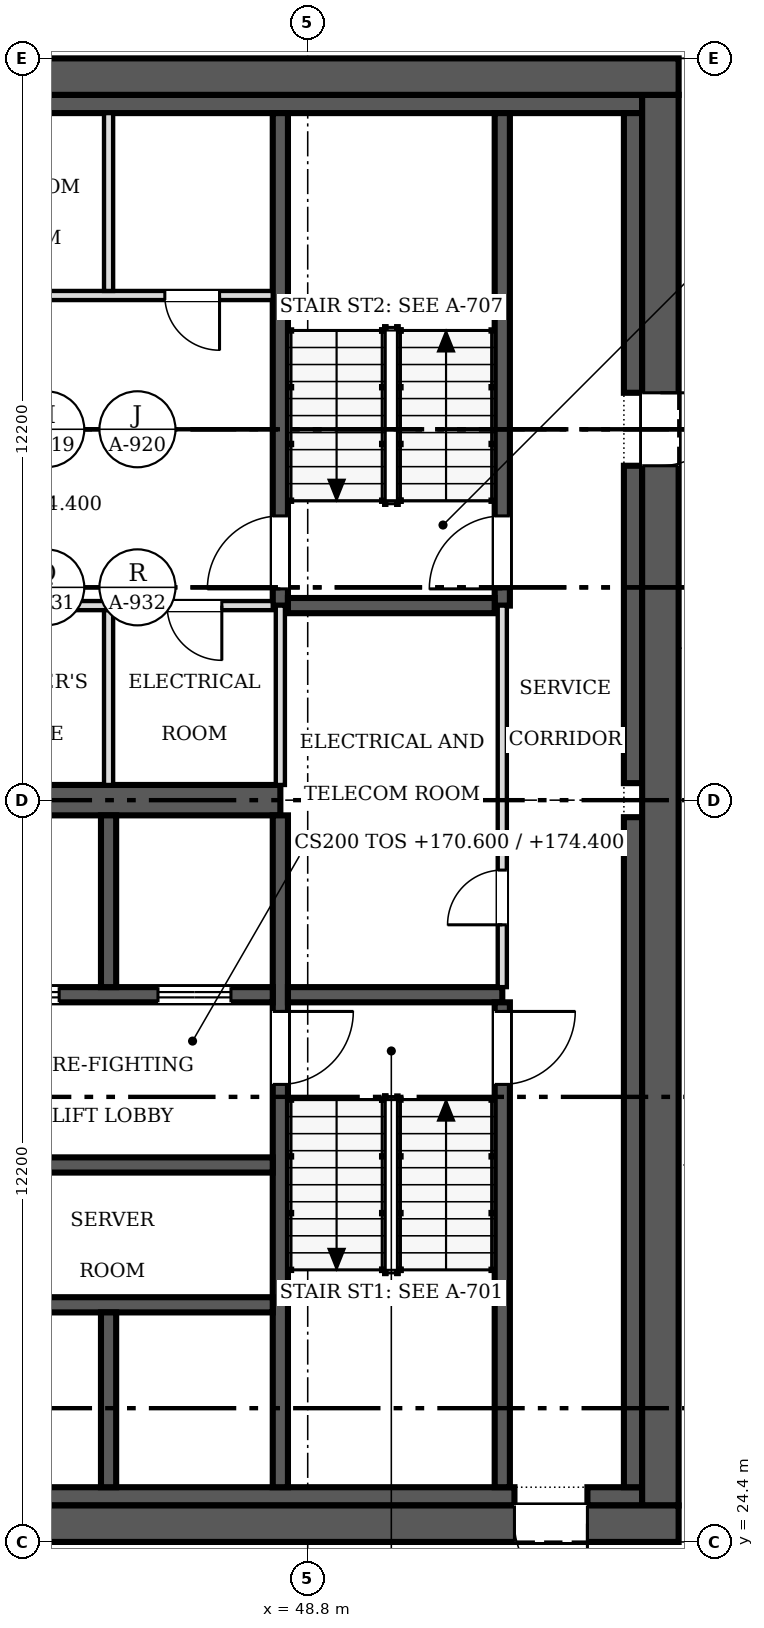
"""IFC4 building model, lengths in metres.
Left out: names, types, materials, properties, quantities, classifications, styles, units other than length and angle.
Written with IfcOpenShell. Run it as: python <this file> out.ifc"""

import sys

from ifc_helpers import new_model, si_unit, direction, frame, frame_2d, origin, place, context, subcontext, project, spatial, rectangle, extrude, source, transform, mapped, element, fill, save


model = new_model("IFC4")
c1 = context("Model", 3, precision=1e-05, world=origin(), true_north=direction((0.0, 1.0)))
c2 = subcontext(c1, "Body", "Model", "MODEL_VIEW")
j1 = project(units=[si_unit("LENGTHUNIT", "METRE"), si_unit("PLANEANGLEUNIT", "RADIAN")], contexts=[c1])
p1 = place(None, origin())
s1 = spatial("IfcSite", under=j1, at=p1, CompositionType="ELEMENT")
p2 = place(p1, origin())
s2 = spatial("IfcBuilding", under=s1, at=p2, CompositionType="ELEMENT")
p3 = place(p2, frame((0.0, 0.0, 170.6)))
s3 = spatial("IfcBuildingStorey", under=s2, at=p3, CompositionType="ELEMENT", Elevation=170.6)
p4 = place(p3, frame((54.9, 24.7, 0.0), z_axis=(0.0, 0.0, 1.0), x_axis=(-1.0, 0.0, 0.0)))
e1 = element("IfcWall", 1, at=p4, inside=s3, PredefinedType="SHEAR", context=c2, shape_type="SweptSolid", body=[
    extrude(rectangle(XDim=24.4, YDim=0.6, at=frame_2d((12.2, 0.0))), origin(), (0.0, 0.0, 1.0), 3.8),
])
m1 = source(origin(), c2, "Body", "SweptSolid", [
    extrude(rectangle(XDim=1.2, YDim=2.1, at=frame_2d((0.6, 1.05))), frame((0.0, 0.31, 0.0), z_axis=(0.0, -1.0, 0.0), x_axis=(1.0, 0.0, 0.0)), (0.0, 0.0, 1.0), 0.62),
])
p5 = place(p4, frame((1.5, 0.0, 0.0)))
e2 = element("IfcOpeningElement", 2, at=p5, cuts=e1, PredefinedType="OPENING", context=c2, shape_type="MappedRepresentation", body=[
    mapped(m1, transform((0.0, 0.0, 0.0), scale=1.0)),
])
p6 = place(p3, frame((30.5, 48.5, 0.0), z_axis=(0.0, 0.0, 1.0), x_axis=(1.0, 0.0, 0.0)))
e3 = element("IfcWall", 3, at=p6, inside=s3, PredefinedType="SHEAR", context=c2, shape_type="SweptSolid", body=[
    extrude(rectangle(XDim=24.4, YDim=0.6, at=frame_2d((12.2, 0.0))), origin(), (0.0, 0.0, 1.0), 3.8),
])
p7 = place(p3, frame((54.6, 48.2, 0.0), z_axis=(0.0, 0.0, 1.0), x_axis=(0.0, -1.0, 0.0)))
e4 = element("IfcWall", 4, at=p7, inside=s3, PredefinedType="SHEAR", context=c2, shape_type="SweptSolid", body=[
    extrude(rectangle(XDim=23.2, YDim=0.6, at=frame_2d((11.6, 0.0))), origin(), (0.0, 0.0, 1.0), 3.8),
])
p8 = place(p7, frame((4.9, 0.0, 0.0)))
e5 = element("IfcOpeningElement", 5, at=p8, cuts=e4, PredefinedType="OPENING", context=c2, shape_type="MappedRepresentation", body=[
    mapped(m1, transform((0.0, 0.0, 0.0), scale=1.0)),
])
p9 = place(p3, frame((31.1, 25.15, 0.0), z_axis=(0.0, 0.0, 1.0), x_axis=(1.0, 0.0, 0.0)))
e6 = element("IfcWall", 6, at=p9, inside=s3, PredefinedType="SOLIDWALL", context=c2, shape_type="SweptSolid", body=[
    extrude(rectangle(XDim=21.1, YDim=0.3, at=frame_2d((10.55, 0.0))), origin(), (0.0, 0.0, 1.0), 3.8),
])
p10 = place(p3, frame((53.4, 25.15, 0.0), z_axis=(0.0, 0.0, 1.0), x_axis=(1.0, 0.0, 0.0)))
e7 = element("IfcWall", 7, at=p10, inside=s3, PredefinedType="SOLIDWALL", context=c2, shape_type="SweptSolid", body=[
    extrude(rectangle(XDim=0.9, YDim=0.3, at=frame_2d((0.45, 0.0))), origin(), (0.0, 0.0, 1.0), 3.8),
])
p11 = place(p3, frame((31.1, 48.05, 0.0), z_axis=(0.0, 0.0, 1.0), x_axis=(1.0, 0.0, 0.0)))
e8 = element("IfcWall", 8, at=p11, inside=s3, PredefinedType="SOLIDWALL", context=c2, shape_type="SweptSolid", body=[
    extrude(rectangle(XDim=23.2, YDim=0.3, at=frame_2d((11.6, 0.0))), origin(), (0.0, 0.0, 1.0), 3.8),
])
p12 = place(p3, frame((54.15, 25.3, 0.0), z_axis=(0.0, 0.0, 1.0), x_axis=(0.0, 1.0, 0.0)))
e9 = element("IfcWall", 9, at=p12, inside=s3, PredefinedType="SOLIDWALL", context=c2, shape_type="SweptSolid", body=[
    extrude(rectangle(XDim=11.02, YDim=0.3, at=frame_2d((5.51, 0.0))), origin(), (0.0, 0.0, 1.0), 3.8),
])
p13 = place(p3, frame((54.15, 36.88, 0.0), z_axis=(0.0, 0.0, 1.0), x_axis=(0.0, 1.0, 0.0)))
e10 = element("IfcWall", 10, at=p13, inside=s3, PredefinedType="SOLIDWALL", context=c2, shape_type="SweptSolid", body=[
    extrude(rectangle(XDim=5.22, YDim=0.3, at=frame_2d((2.61, 0.0))), origin(), (0.0, 0.0, 1.0), 3.8),
])
p14 = place(p3, frame((54.15, 43.3, 0.0), z_axis=(0.0, 0.0, 1.0), x_axis=(0.0, 1.0, 0.0)))
e11 = element("IfcWall", 11, at=p14, inside=s3, PredefinedType="SOLIDWALL", context=c2, shape_type="SweptSolid", body=[
    extrude(rectangle(XDim=4.6, YDim=0.3, at=frame_2d((2.3, 0.0))), origin(), (0.0, 0.0, 1.0), 3.8),
])
p15 = place(p3, frame((31.4, 36.6, 0.0), z_axis=(0.0, 0.0, 1.0), x_axis=(1.0, 0.0, 0.0)))
e12 = element("IfcWall", 12, at=p15, inside=s3, PredefinedType="SHEAR", context=c2, shape_type="SweptSolid", body=[
    extrude(rectangle(XDim=16.95, YDim=0.5, at=frame_2d((8.475, 0.0))), origin(), (0.0, 0.0, 1.0), 3.8),
])
p16 = place(p3, frame((48.35, 36.35, 0.0), z_axis=(0.0, 0.0, 1.0), x_axis=(0.0, -1.0, 0.0)))
e13 = element("IfcWall", 13, at=p16, inside=s3, PredefinedType="SOLIDWALL", context=c2, shape_type="SweptSolid", body=[
    extrude(rectangle(XDim=11.05, YDim=0.25, at=frame_2d((5.525, 0.0))), origin(), (0.0, 0.0, 1.0), 3.8),
])
m2 = source(origin(), c2, "Body", "SweptSolid", [
    extrude(rectangle(XDim=1.2, YDim=2.1, at=frame_2d((0.6, 1.05))), frame((0.0, 0.135, 0.0), z_axis=(0.0, -1.0, 0.0), x_axis=(1.0, 0.0, 0.0)), (0.0, 0.0, 1.0), 0.27),
])
p17 = place(p16, frame((3.225, 0.0, 0.0)))
e14 = element("IfcOpeningElement", 14, at=p17, cuts=e13, PredefinedType="OPENING", context=c2, shape_type="MappedRepresentation", body=[
    mapped(m2, transform((0.0, 0.0, 0.0), scale=1.0)),
])
p18 = place(p3, frame((48.225, 33.4, 0.0), z_axis=(0.0, 0.0, 1.0), x_axis=(-1.0, 0.0, 0.0)))
e15 = element("IfcWall", 15, at=p18, inside=s3, PredefinedType="SOLIDWALL", context=c2, shape_type="SweptSolid", body=[
    extrude(rectangle(XDim=5.275, YDim=0.25, at=frame_2d((2.638, 0.0))), origin(), (0.0, 0.0, 1.0), 3.8),
])
p19 = place(p18, frame((3.512, 0.0, 0.0)))
e16 = element("IfcOpeningElement", 16, at=p19, cuts=e15, PredefinedType="OPENING", context=c2, shape_type="MappedRepresentation", body=[
    mapped(m2, transform((0.0, 0.0, 0.0), scale=1.0)),
])
p20 = place(p18, frame((0.688, 0.0, 0.0)))
e17 = element("IfcOpeningElement", 17, at=p20, cuts=e15, PredefinedType="OPENING", context=c2, shape_type="MappedRepresentation", body=[
    mapped(m2, transform((0.0, 0.0, 0.0), scale=1.0)),
])
p21 = place(p3, frame((48.475, 33.4, 0.0), z_axis=(0.0, 0.0, 1.0), x_axis=(1.0, 0.0, 0.0)))
e18 = element("IfcWall", 18, at=p21, inside=s3, PredefinedType="SOLIDWALL", context=c2, shape_type="SweptSolid", body=[
    extrude(rectangle(XDim=3.525, YDim=0.25, at=frame_2d((1.762, 0.0))), origin(), (0.0, 0.0, 1.0), 3.8),
])
p22 = place(p3, frame((48.35, 47.9, 0.0), z_axis=(0.0, 0.0, 1.0), x_axis=(0.0, -1.0, 0.0)))
e19 = element("IfcWall", 19, at=p22, inside=s3, PredefinedType="SOLIDWALL", context=c2, shape_type="SweptSolid", body=[
    extrude(rectangle(XDim=8.1, YDim=0.25, at=frame_2d((4.05, 0.0))), origin(), (0.0, 0.0, 1.0), 3.8),
])
p23 = place(p22, frame((6.625, 0.0, 0.0)))
e20 = element("IfcOpeningElement", 20, at=p23, cuts=e19, PredefinedType="OPENING", context=c2, shape_type="MappedRepresentation", body=[
    mapped(m2, transform((0.0, 0.0, 0.0), scale=1.0)),
])
p24 = place(p3, frame((52.0, 25.3, 0.0), z_axis=(0.0, 0.0, 1.0), x_axis=(0.0, 1.0, 0.0)))
e21 = element("IfcWall", 21, at=p24, inside=s3, PredefinedType="SOLIDWALL", context=c2, shape_type="SweptSolid", body=[
    extrude(rectangle(XDim=7.975, YDim=0.25, at=frame_2d((3.987, 0.0))), origin(), (0.0, 0.0, 1.0), 3.8),
])
p25 = place(p24, frame((6.625, 0.0, 0.0)))
e22 = element("IfcOpeningElement", 22, at=p25, cuts=e21, PredefinedType="OPENING", context=c2, shape_type="MappedRepresentation", body=[
    mapped(m2, transform((0.0, 0.0, 0.0), scale=1.0)),
])
p26 = place(p3, frame((52.0, 39.8, 0.0), z_axis=(0.0, 0.0, 1.0), x_axis=(0.0, 1.0, 0.0)))
e23 = element("IfcWall", 23, at=p26, inside=s3, PredefinedType="SOLIDWALL", context=c2, shape_type="SweptSolid", body=[
    extrude(rectangle(XDim=8.1, YDim=0.25, at=frame_2d((4.05, 0.0))), origin(), (0.0, 0.0, 1.0), 3.8),
])
p27 = place(p26, frame((0.275, 0.0, 0.0)))
e24 = element("IfcOpeningElement", 24, at=p27, cuts=e23, PredefinedType="OPENING", context=c2, shape_type="MappedRepresentation", body=[
    mapped(m2, transform((0.0, 0.0, 0.0), scale=1.0)),
])
for number, where, z_axis, x_axis in (
    (25, (42.95, 28.3, 0.0), (0.0, 0.0, 1.0), (1.0, 0.0, 0.0)),
    (26, (42.95, 30.6, 0.0), (0.0, 0.0, 1.0), (1.0, 0.0, 0.0)),
):
    element("IfcWall", number, at=place(p3, frame(where, z_axis=z_axis, x_axis=x_axis)), inside=s3, PredefinedType="SOLIDWALL", context=c2, shape_type="SweptSolid", body=[
        extrude(rectangle(XDim=5.275, YDim=0.25, at=frame_2d((2.638, 0.0))), origin(), (0.0, 0.0, 1.0), 3.8),
    ])
p28 = place(p3, frame((48.475, 39.8, 0.0), z_axis=(0.0, 0.0, 1.0), x_axis=(1.0, 0.0, 0.0)))
e27 = element("IfcWall", 27, at=p28, inside=s3, PredefinedType="SOLIDWALL", context=c2, shape_type="SweptSolid", body=[
    extrude(rectangle(XDim=3.4, YDim=0.25, at=frame_2d((1.7, 0.0))), origin(), (0.0, 0.0, 1.0), 3.8),
])
p29 = place(p3, frame((45.525, 33.525, 0.0), z_axis=(0.0, 0.0, 1.0), x_axis=(0.0, 1.0, 0.0)))
e28 = element("IfcWall", 28, at=p29, inside=s3, PredefinedType="SOLIDWALL", context=c2, shape_type="SweptSolid", body=[
    extrude(rectangle(XDim=2.825, YDim=0.25, at=frame_2d((1.413, 0.0))), origin(), (0.0, 0.0, 1.0), 3.8),
])
p30 = place(p3, frame((45.525, 25.3, 0.0), z_axis=(0.0, 0.0, 1.0), x_axis=(0.0, 1.0, 0.0)))
e29 = element("IfcWall", 29, at=p30, inside=s3, PredefinedType="SOLIDWALL", context=c2, shape_type="SweptSolid", body=[
    extrude(rectangle(XDim=2.875, YDim=0.25, at=frame_2d((1.438, 0.0))), origin(), (0.0, 0.0, 1.0), 3.8),
])
p31 = place(p3, frame((52.0, 33.525, 0.0), z_axis=(0.0, 0.0, 1.0), x_axis=(0.0, 1.0, 0.0)))
e30 = element("IfcWall", 30, at=p31, inside=s3, PredefinedType="PARTITIONING", context=c2, shape_type="SweptSolid", body=[
    extrude(rectangle(XDim=6.275, YDim=0.15, at=frame_2d((3.138, 0.0))), origin(), (0.0, 0.0, 1.0), 3.6),
])
m3 = source(origin(), c2, "Body", "SweptSolid", [
    extrude(rectangle(XDim=0.9, YDim=2.1, at=frame_2d((0.45, 1.05))), frame((0.0, 0.085, 0.0), z_axis=(0.0, -1.0, 0.0), x_axis=(1.0, 0.0, 0.0)), (0.0, 0.0, 1.0), 0.17),
])
p32 = place(p31, frame((1.025, 0.0, 0.0)))
e31 = element("IfcOpeningElement", 31, at=p32, cuts=e30, PredefinedType="OPENING", context=c2, shape_type="MappedRepresentation", body=[
    mapped(m3, transform((0.0, 0.0, 0.0), scale=1.0)),
])
p33 = place(p3, frame((48.225, 39.8, 0.0), z_axis=(0.0, 0.0, 1.0), x_axis=(-1.0, 0.0, 0.0)))
e32 = element("IfcWall", 32, at=p33, inside=s3, PredefinedType="PARTITIONING", context=c2, shape_type="SweptSolid", body=[
    extrude(rectangle(XDim=5.275, YDim=0.15, at=frame_2d((2.638, 0.0))), origin(), (0.0, 0.0, 1.0), 3.6),
])
p34 = place(p33, frame((3.663, 0.0, 0.0)))
e33 = element("IfcOpeningElement", 33, at=p34, cuts=e32, PredefinedType="OPENING", context=c2, shape_type="MappedRepresentation", body=[
    mapped(m3, transform((0.0, 0.0, 0.0), scale=1.0)),
])
p35 = place(p33, frame((0.837, 0.0, 0.0)))
e34 = element("IfcOpeningElement", 34, at=p35, cuts=e32, PredefinedType="OPENING", context=c2, shape_type="MappedRepresentation", body=[
    mapped(m3, transform((0.0, 0.0, 0.0), scale=1.0)),
])
p36 = place(p3, frame((42.95, 44.9, 0.0), z_axis=(0.0, 0.0, 1.0), x_axis=(1.0, 0.0, 0.0)))
e35 = element("IfcWall", 35, at=p36, inside=s3, PredefinedType="PARTITIONING", context=c2, shape_type="SweptSolid", body=[
    extrude(rectangle(XDim=5.275, YDim=0.15, at=frame_2d((2.638, 0.0))), origin(), (0.0, 0.0, 1.0), 3.6),
])
p37 = place(p36, frame((0.712, 0.0, 0.0)))
e36 = element("IfcOpeningElement", 36, at=p37, cuts=e35, PredefinedType="OPENING", context=c2, shape_type="MappedRepresentation", body=[
    mapped(m3, transform((0.0, 0.0, 0.0), scale=1.0)),
])
p38 = place(p36, frame((3.5, 0.0, 0.0)))
e37 = element("IfcOpeningElement", 37, at=p38, cuts=e35, PredefinedType="OPENING", context=c2, shape_type="MappedRepresentation", body=[
    mapped(m3, transform((0.0, 0.0, 0.0), scale=1.0)),
])
p39 = place(p3, frame((45.525, 36.85, 0.0), z_axis=(0.0, 0.0, 1.0), x_axis=(0.0, 1.0, 0.0)))
e38 = element("IfcWall", 38, at=p39, inside=s3, PredefinedType="PARTITIONING", context=c2, shape_type="SweptSolid", body=[
    extrude(rectangle(XDim=2.875, YDim=0.15, at=frame_2d((1.438, 0.0))), origin(), (0.0, 0.0, 1.0), 3.6),
])
p40 = place(p3, frame((48.35, 36.85, 0.0), z_axis=(0.0, 0.0, 1.0), x_axis=(0.0, 1.0, 0.0)))
e39 = element("IfcWall", 39, at=p40, inside=s3, PredefinedType="PARTITIONING", context=c2, shape_type="SweptSolid", body=[
    extrude(rectangle(XDim=2.95, YDim=0.15, at=frame_2d((1.475, 0.0))), origin(), (0.0, 0.0, 1.0), 3.6),
])
p41 = place(p3, frame((45.525, 44.975, 0.0), z_axis=(0.0, 0.0, 1.0), x_axis=(0.0, 1.0, 0.0)))
e40 = element("IfcWall", 40, at=p41, inside=s3, PredefinedType="PARTITIONING", context=c2, shape_type="SweptSolid", body=[
    extrude(rectangle(XDim=2.925, YDim=0.15, at=frame_2d((1.462, 0.0))), origin(), (0.0, 0.0, 1.0), 3.6),
])
m4 = source(origin(), c2, "Body", "SweptSolid", [
    extrude(rectangle(XDim=1.2, YDim=2.1, at=frame_2d((0.6, 1.05))), frame((0.0, 0.025, 0.0), z_axis=(0.0, -1.0, 0.0), x_axis=(1.0, 0.0, 0.0)), (0.0, 0.0, 1.0), 0.05),
])
p42 = place(p5, origin())
e41 = element("IfcDoor", 41, at=p42, inside=s3, OperationType="SINGLE_SWING_LEFT", PredefinedType="DOOR", context=c2, shape_type="MappedRepresentation", body=[
    mapped(m4, transform((0.0, 0.0, 0.0), scale=1.0)),
])
fill(e2, e41)
p43 = place(p8, origin())
e42 = element("IfcDoor", 42, at=p43, inside=s3, OperationType="SINGLE_SWING_LEFT", PredefinedType="DOOR", context=c2, shape_type="MappedRepresentation", body=[
    mapped(m4, transform((0.0, 0.0, 0.0), scale=1.0)),
])
fill(e5, e42)
p44 = place(p17, origin())
e43 = element("IfcDoor", 43, at=p44, inside=s3, OperationType="SINGLE_SWING_LEFT", PredefinedType="DOOR", context=c2, shape_type="MappedRepresentation", body=[
    mapped(m4, transform((0.0, 0.0, 0.0), scale=1.0)),
])
fill(e14, e43)
p45 = place(p19, origin())
e44 = element("IfcDoor", 44, at=p45, inside=s3, OperationType="DOUBLE_DOOR_SLIDING", PredefinedType="DOOR", context=c2, shape_type="MappedRepresentation", body=[
    mapped(m4, transform((0.0, 0.0, 0.0), scale=1.0)),
])
fill(e16, e44)
p46 = place(p20, origin())
e45 = element("IfcDoor", 45, at=p46, inside=s3, OperationType="DOUBLE_DOOR_SLIDING", PredefinedType="DOOR", context=c2, shape_type="MappedRepresentation", body=[
    mapped(m4, transform((0.0, 0.0, 0.0), scale=1.0)),
])
fill(e17, e45)
p47 = place(p23, origin())
e46 = element("IfcDoor", 46, at=p47, inside=s3, OperationType="SINGLE_SWING_RIGHT", PredefinedType="DOOR", context=c2, shape_type="MappedRepresentation", body=[
    mapped(m4, transform((0.0, 0.0, 0.0), scale=1.0)),
])
fill(e20, e46)
p48 = place(p25, origin())
e47 = element("IfcDoor", 47, at=p48, inside=s3, OperationType="SINGLE_SWING_RIGHT", PredefinedType="DOOR", context=c2, shape_type="MappedRepresentation", body=[
    mapped(m4, transform((0.0, 0.0, 0.0), scale=1.0)),
])
fill(e22, e47)
p49 = place(p27, origin())
e48 = element("IfcDoor", 48, at=p49, inside=s3, OperationType="SINGLE_SWING_LEFT", PredefinedType="DOOR", context=c2, shape_type="MappedRepresentation", body=[
    mapped(m4, transform((0.0, 0.0, 0.0), scale=1.0)),
])
fill(e24, e48)
m5 = source(origin(), c2, "Body", "SweptSolid", [
    extrude(rectangle(XDim=0.9, YDim=2.1, at=frame_2d((0.45, 1.05))), frame((0.0, 0.025, 0.0), z_axis=(0.0, -1.0, 0.0), x_axis=(1.0, 0.0, 0.0)), (0.0, 0.0, 1.0), 0.05),
])
p50 = place(p32, origin())
e49 = element("IfcDoor", 49, at=p50, inside=s3, OperationType="SINGLE_SWING_LEFT", PredefinedType="DOOR", context=c2, shape_type="MappedRepresentation", body=[
    mapped(m5, transform((0.0, 0.0, 0.0), scale=1.0)),
])
fill(e31, e49)
p51 = place(p35, origin())
e50 = element("IfcDoor", 50, at=p51, inside=s3, OperationType="SINGLE_SWING_LEFT", PredefinedType="DOOR", context=c2, shape_type="MappedRepresentation", body=[
    mapped(m5, transform((0.0, 0.0, 0.0), scale=1.0)),
])
fill(e34, e50)
p52 = place(p38, origin())
e51 = element("IfcDoor", 51, at=p52, inside=s3, OperationType="SINGLE_SWING_RIGHT", PredefinedType="DOOR", context=c2, shape_type="MappedRepresentation", body=[
    mapped(m5, transform((0.0, 0.0, 0.0), scale=1.0)),
])
fill(e37, e51)
save(model, sys.argv[1])
